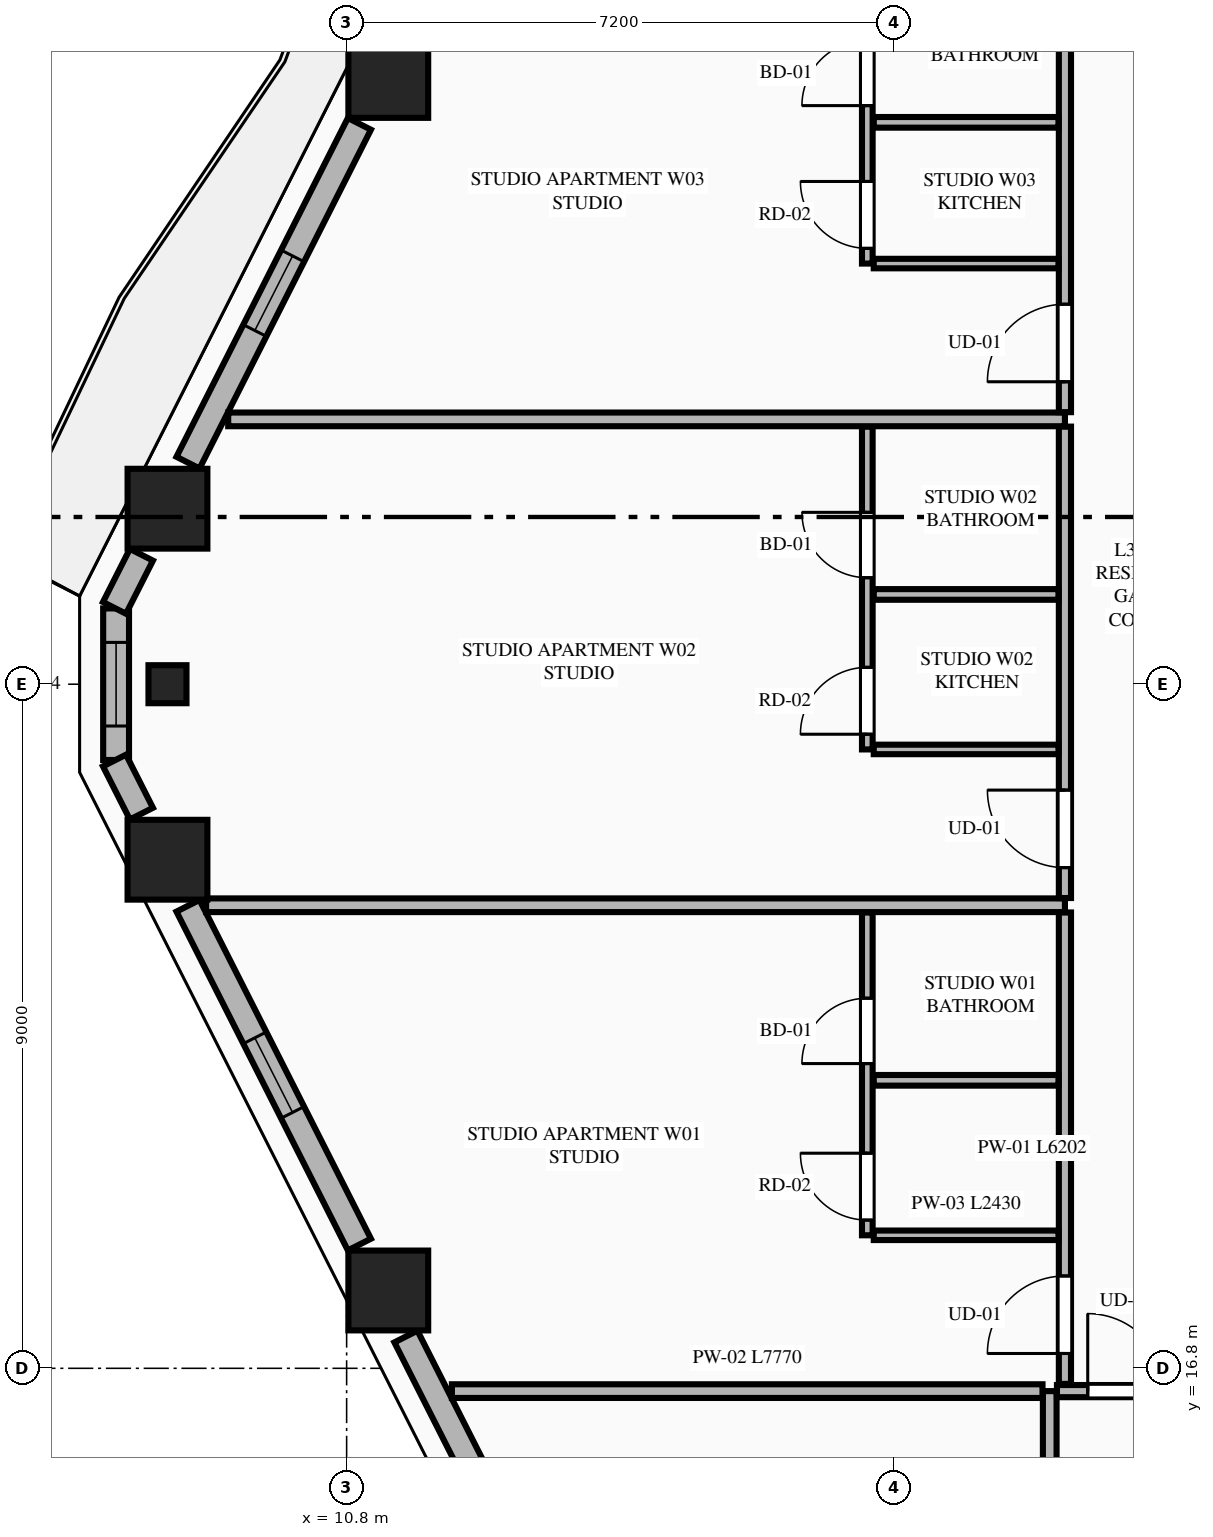
"""IFC4 building model, lengths in metres.
Left out: names, types, materials, properties, quantities, classifications, styles, units other than length and angle.
Written with IfcOpenShell. Run it as: python <this file> out.ifc"""

import sys

from ifc_helpers import new_model, si_unit, direction, frame, frame_2d, origin, origin_2d, place, context, subcontext, project, spatial, rectangle, extrude, element, fill, save


model = new_model("IFC4")
c1 = context("Model", 3, precision=1e-05, world=origin(), true_north=direction((0.0, 1.0)))
c2 = subcontext(c1, "Body", "Model", "MODEL_VIEW")
j1 = project(units=[si_unit("LENGTHUNIT", "METRE"), si_unit("PLANEANGLEUNIT", "RADIAN")], contexts=[c1])
p1 = place(None, origin())
s1 = spatial("IfcSite", under=j1, at=p1, CompositionType="ELEMENT")
p2 = place(p1, origin())
s2 = spatial("IfcBuilding", under=s1, at=p2, CompositionType="ELEMENT")
p3 = place(p2, frame((0.0, 0.0, 137.45)))
s3 = spatial("IfcBuildingStorey", under=s2, at=p3, CompositionType="ELEMENT", Elevation=137.45)
for number, where, z_axis, x_axis in (
    (1, (11.348, 33.776, 0.0), (0.0, 0.0, 1.0), (1.0, 0.0, 0.0)),
    (2, (8.443, 28.109, 0.0), (0.0, 0.0, 1.0), (1.0, 0.0, 0.0)),
    (3, (8.443, 23.491, 0.0), (0.0, 0.0, 1.0), (1.0, 0.0, 0.0)),
    (4, (11.348, 17.824, 0.0), (0.0, 0.0, 1.0), (1.0, 0.0, 0.0)),
):
    element("IfcColumn", number, at=place(p3, frame(where, z_axis=z_axis, x_axis=x_axis)), inside=s3, PredefinedType="COLUMN", context=c2, shape_type="SweptSolid", body=[
        extrude(rectangle(XDim=1.05, YDim=1.05, at=origin_2d()), origin(), (0.0, 0.0, 1.0), 3.55),
    ])
p4 = place(p3, frame((8.443, 25.8, 0.0), z_axis=(0.0, 0.0, 1.0), x_axis=(0.0, -1.0, 0.0)))
e5 = element("IfcColumn", 5, at=p4, inside=s3, PredefinedType="PILASTER", context=c2, shape_type="SweptSolid", body=[
    extrude(rectangle(XDim=0.5, YDim=0.35, at=origin_2d()), origin(), (0.0, 0.0, 1.0), 3.55),
])
p5 = place(p3, frame((7.767, 26.797, 0.0), z_axis=(0.0, 0.0, 1.0), x_axis=(0.0, -1.0, 0.0)))
e6 = element("IfcWall", 6, at=p5, inside=s3, PredefinedType="STANDARD", context=c2, shape_type="SweptSolid", body=[
    extrude(rectangle(XDim=1.994, YDim=0.34, at=frame_2d((0.997, 0.0))), origin(), (0.0, 0.0, 1.0), 3.34),
])
p6 = place(p5, frame((0.447, 0.0, 0.75)))
e7 = element("IfcOpeningElement", 7, at=p6, cuts=e6, PredefinedType="OPENING", context=c2, shape_type="SweptSolid", body=[
    extrude(rectangle(XDim=1.1, YDim=2.0, at=frame_2d((0.55, 1.0))), frame((0.0, 0.18, 0.0), z_axis=(0.0, -1.0, 0.0), x_axis=(1.0, 0.0, 0.0)), (0.0, 0.0, 1.0), 0.36),
])
p7 = place(p3, frame((10.968, 33.172, 0.0), z_axis=(0.0, 0.0, 1.0), x_axis=(-0.451470533039, -0.892286029139, 0.0)))
e8 = element("IfcWall", 8, at=p7, inside=s3, PredefinedType="STANDARD", context=c2, shape_type="SweptSolid", body=[
    extrude(rectangle(XDim=4.995, YDim=0.34, at=frame_2d((2.498, 0.0))), origin(), (0.0, 0.0, 1.0), 2.797),
])
p8 = place(p7, frame((1.947, 0.0, 0.75)))
e9 = element("IfcOpeningElement", 9, at=p8, cuts=e8, PredefinedType="OPENING", context=c2, shape_type="SweptSolid", body=[
    extrude(rectangle(XDim=1.1, YDim=1.897, at=frame_2d((0.55, 0.948))), frame((0.0, 0.18, 0.0), z_axis=(0.0, -1.0, 0.0), x_axis=(1.0, 0.0, 0.0)), (0.0, 0.0, 1.0), 0.36),
])
for number, where, z_axis, x_axis in (
    (10, (8.1, 27.503, 0.0), (0.0, 0.0, 1.0), (-0.452, -0.892, 0.0)),
    (11, (7.746, 24.796, 0.0), (0.0, 0.0, 1.0), (0.452, -0.892, 0.0)),
):
    element("IfcWall", number, at=place(p3, frame(where, z_axis=z_axis, x_axis=x_axis)), inside=s3, PredefinedType="STANDARD", context=c2, shape_type="SweptSolid", body=[
        extrude(rectangle(XDim=0.783, YDim=0.34, at=frame_2d((0.392, 0.0))), origin(), (0.0, 0.0, 1.0), 3.34),
    ])
p9 = place(p3, frame((8.713, 22.885, 0.0), z_axis=(0.0, 0.0, 1.0), x_axis=(0.451470533039, -0.892286029139, 0.0)))
e12 = element("IfcWall", 12, at=p9, inside=s3, PredefinedType="STANDARD", context=c2, shape_type="SweptSolid", body=[
    extrude(rectangle(XDim=4.995, YDim=0.34, at=frame_2d((2.498, 0.0))), origin(), (0.0, 0.0, 1.0), 2.797),
])
p10 = place(p9, frame((1.947, 0.0, 0.75)))
e13 = element("IfcOpeningElement", 13, at=p10, cuts=e12, PredefinedType="OPENING", context=c2, shape_type="SweptSolid", body=[
    extrude(rectangle(XDim=1.1, YDim=1.897, at=frame_2d((0.55, 0.948))), frame((0.0, 0.18, 0.0), z_axis=(0.0, -1.0, 0.0), x_axis=(1.0, 0.0, 0.0)), (0.0, 0.0, 1.0), 0.36),
])
p11 = place(p3, frame((11.58, 17.218, 0.0), z_axis=(0.0, 0.0, 1.0), x_axis=(0.451567731634, -0.892236842855, 0.0)))
e14 = element("IfcWall", 14, at=p11, inside=s3, PredefinedType="STANDARD", context=c2, shape_type="SweptSolid", body=[
    extrude(rectangle(XDim=5.219, YDim=0.34, at=frame_2d((2.61, 0.0))), origin(), (0.0, 0.0, 1.0), 2.797),
])
p12 = place(p11, frame((2.06, 0.0, 0.75)))
e15 = element("IfcOpeningElement", 15, at=p12, cuts=e14, PredefinedType="OPENING", context=c2, shape_type="SweptSolid", body=[
    extrude(rectangle(XDim=1.1, YDim=1.897, at=frame_2d((0.55, 0.948))), frame((0.0, 0.18, 0.0), z_axis=(0.0, -1.0, 0.0), x_axis=(1.0, 0.0, 0.0)), (0.0, 0.0, 1.0), 0.36),
])
p13 = place(p3, frame((20.05, 4.105, 0.0), z_axis=(0.0, 0.0, 1.0), x_axis=(0.0, 1.0, 0.0)))
e16 = element("IfcWall", 16, at=p13, inside=s3, PredefinedType="PARTITIONING", context=c2, shape_type="SweptSolid", body=[
    extrude(rectangle(XDim=12.395, YDim=0.18, at=frame_2d((6.198, 0.0))), origin(), (0.0, 0.0, 1.0), 3.34),
])
p14 = place(p3, frame((20.145, 16.5, 0.0), z_axis=(0.0, 0.0, 1.0), x_axis=(1.0, 0.0, 0.0)))
e17 = element("IfcWall", 17, at=p14, inside=s3, PredefinedType="PARTITIONING", context=c2, shape_type="SweptSolid", body=[
    extrude(rectangle(XDim=8.328, YDim=0.16, at=frame_2d((4.164, 0.0))), origin(), (0.0, 0.0, 1.0), 3.34),
])
p15 = place(p14, frame((0.405, 0.0, 0.0)))
e18 = element("IfcOpeningElement", 18, at=p15, cuts=e17, PredefinedType="OPENING", context=c2, shape_type="SweptSolid", body=[
    extrude(rectangle(XDim=1.02, YDim=2.25, at=frame_2d((0.51, 1.125))), frame((0.0, 0.09, 0.0), z_axis=(0.0, -1.0, 0.0), x_axis=(1.0, 0.0, 0.0)), (0.0, 0.0, 1.0), 0.18),
])
p16 = place(p3, frame((12.185, 16.5, 0.0), z_axis=(0.0, 0.0, 1.0), x_axis=(1.0, 0.0, 0.0)))
e19 = element("IfcWall", 19, at=p16, inside=s3, PredefinedType="PARTITIONING", context=c2, shape_type="SweptSolid", body=[
    extrude(rectangle(XDim=7.77, YDim=0.18, at=frame_2d((3.885, 0.0))), origin(), (0.0, 0.0, 1.0), 3.34),
])
p17 = place(p3, frame((20.25, 16.595, 0.0), z_axis=(0.0, 0.0, 1.0), x_axis=(0.0, 1.0, 0.0)))
e20 = element("IfcWall", 20, at=p17, inside=s3, PredefinedType="PARTITIONING", context=c2, shape_type="SweptSolid", body=[
    extrude(rectangle(XDim=6.202, YDim=0.16, at=frame_2d((3.101, 0.0))), origin(), (0.0, 0.0, 1.0), 3.34),
])
p18 = place(p17, frame((0.4, 0.0, 0.0)))
e21 = element("IfcOpeningElement", 21, at=p18, cuts=e20, PredefinedType="OPENING", context=c2, shape_type="SweptSolid", body=[
    extrude(rectangle(XDim=1.02, YDim=2.25, at=frame_2d((0.51, 1.125))), frame((0.0, 0.09, 0.0), z_axis=(0.0, -1.0, 0.0), x_axis=(1.0, 0.0, 0.0)), (0.0, 0.0, 1.0), 0.18),
])
p19 = place(p3, frame((17.735, 18.55, 0.0), z_axis=(0.0, 0.0, 1.0), x_axis=(1.0, 0.0, 0.0)))
e22 = element("IfcWall", 22, at=p19, inside=s3, PredefinedType="PARTITIONING", context=c2, shape_type="SweptSolid", body=[
    extrude(rectangle(XDim=2.43, YDim=0.125, at=frame_2d((1.215, 0.0))), origin(), (0.0, 0.0, 1.0), 2.722),
])
p20 = place(p3, frame((17.65, 18.55, 0.0), z_axis=(0.0, 0.0, 1.0), x_axis=(0.0, 1.0, 0.0)))
e23 = element("IfcWall", 23, at=p20, inside=s3, PredefinedType="PLUMBINGWALL", context=c2, shape_type="SweptSolid", body=[
    extrude(rectangle(XDim=4.247, YDim=0.14, at=frame_2d((2.124, 0.0))), origin(), (0.0, 0.0, 1.0), 3.34),
])
p21 = place(p20, frame((2.259, 0.0, 0.0)))
e24 = element("IfcOpeningElement", 24, at=p21, cuts=e23, PredefinedType="OPENING", context=c2, shape_type="SweptSolid", body=[
    extrude(rectangle(XDim=0.86, YDim=2.1, at=frame_2d((0.43, 1.05))), frame((0.0, 0.08, 0.0), z_axis=(0.0, -1.0, 0.0), x_axis=(1.0, 0.0, 0.0)), (0.0, 0.0, 1.0), 0.16),
])
p22 = place(p20, frame((0.2, 0.0, 0.0)))
e25 = element("IfcOpeningElement", 25, at=p22, cuts=e23, PredefinedType="OPENING", context=c2, shape_type="SweptSolid", body=[
    extrude(rectangle(XDim=0.88, YDim=2.15, at=frame_2d((0.44, 1.075))), frame((0.0, 0.08, 0.0), z_axis=(0.0, -1.0, 0.0), x_axis=(1.0, 0.0, 0.0)), (0.0, 0.0, 1.0), 0.16),
])
p23 = place(p3, frame((17.735, 20.589, 0.0), z_axis=(0.0, 0.0, 1.0), x_axis=(1.0, 0.0, 0.0)))
e26 = element("IfcWall", 26, at=p23, inside=s3, PredefinedType="PLUMBINGWALL", context=c2, shape_type="SweptSolid", body=[
    extrude(rectangle(XDim=2.43, YDim=0.14, at=frame_2d((1.215, 0.0))), origin(), (0.0, 0.0, 1.0), 3.34),
])
p24 = place(p3, frame((8.951, 22.892, 0.0), z_axis=(0.0, 0.0, 1.0), x_axis=(1.0, 0.0, 0.0)))
e27 = element("IfcWall", 27, at=p24, inside=s3, PredefinedType="PARTITIONING", context=c2, shape_type="SweptSolid", body=[
    extrude(rectangle(XDim=11.299, YDim=0.18, at=frame_2d((5.649, 0.0))), origin(), (0.0, 0.0, 1.0), 3.34),
])
p25 = place(p3, frame((20.25, 22.987, 0.0), z_axis=(0.0, 0.0, 1.0), x_axis=(0.0, 1.0, 0.0)))
e28 = element("IfcWall", 28, at=p25, inside=s3, PredefinedType="PARTITIONING", context=c2, shape_type="SweptSolid", body=[
    extrude(rectangle(XDim=6.202, YDim=0.16, at=frame_2d((3.101, 0.0))), origin(), (0.0, 0.0, 1.0), 3.34),
])
p26 = place(p25, frame((0.4, 0.0, 0.0)))
e29 = element("IfcOpeningElement", 29, at=p26, cuts=e28, PredefinedType="OPENING", context=c2, shape_type="SweptSolid", body=[
    extrude(rectangle(XDim=1.02, YDim=2.25, at=frame_2d((0.51, 1.125))), frame((0.0, 0.09, 0.0), z_axis=(0.0, -1.0, 0.0), x_axis=(1.0, 0.0, 0.0)), (0.0, 0.0, 1.0), 0.18),
])
p27 = place(p3, frame((17.735, 24.942, 0.0), z_axis=(0.0, 0.0, 1.0), x_axis=(1.0, 0.0, 0.0)))
e30 = element("IfcWall", 30, at=p27, inside=s3, PredefinedType="PARTITIONING", context=c2, shape_type="SweptSolid", body=[
    extrude(rectangle(XDim=2.43, YDim=0.125, at=frame_2d((1.215, 0.0))), origin(), (0.0, 0.0, 1.0), 3.34),
])
p28 = place(p3, frame((17.65, 24.942, 0.0), z_axis=(0.0, 0.0, 1.0), x_axis=(0.0, 1.0, 0.0)))
e31 = element("IfcWall", 31, at=p28, inside=s3, PredefinedType="PLUMBINGWALL", context=c2, shape_type="SweptSolid", body=[
    extrude(rectangle(XDim=4.247, YDim=0.14, at=frame_2d((2.124, 0.0))), origin(), (0.0, 0.0, 1.0), 3.34),
])
p29 = place(p28, frame((2.259, 0.0, 0.0)))
e32 = element("IfcOpeningElement", 32, at=p29, cuts=e31, PredefinedType="OPENING", context=c2, shape_type="SweptSolid", body=[
    extrude(rectangle(XDim=0.86, YDim=2.1, at=frame_2d((0.43, 1.05))), frame((0.0, 0.08, 0.0), z_axis=(0.0, -1.0, 0.0), x_axis=(1.0, 0.0, 0.0)), (0.0, 0.0, 1.0), 0.16),
])
p30 = place(p28, frame((0.2, 0.0, 0.0)))
e33 = element("IfcOpeningElement", 33, at=p30, cuts=e31, PredefinedType="OPENING", context=c2, shape_type="SweptSolid", body=[
    extrude(rectangle(XDim=0.88, YDim=2.15, at=frame_2d((0.44, 1.075))), frame((0.0, 0.08, 0.0), z_axis=(0.0, -1.0, 0.0), x_axis=(1.0, 0.0, 0.0)), (0.0, 0.0, 1.0), 0.16),
])
p31 = place(p3, frame((17.735, 26.981, 0.0), z_axis=(0.0, 0.0, 1.0), x_axis=(1.0, 0.0, 0.0)))
e34 = element("IfcWall", 34, at=p31, inside=s3, PredefinedType="PLUMBINGWALL", context=c2, shape_type="SweptSolid", body=[
    extrude(rectangle(XDim=2.43, YDim=0.14, at=frame_2d((1.215, 0.0))), origin(), (0.0, 0.0, 1.0), 3.34),
])
p32 = place(p3, frame((9.242, 29.284, 0.0), z_axis=(0.0, 0.0, 1.0), x_axis=(1.0, 0.0, 0.0)))
e35 = element("IfcWall", 35, at=p32, inside=s3, PredefinedType="PARTITIONING", context=c2, shape_type="SweptSolid", body=[
    extrude(rectangle(XDim=11.008, YDim=0.18, at=frame_2d((5.504, 0.0))), origin(), (0.0, 0.0, 1.0), 3.34),
])
p33 = place(p3, frame((20.25, 29.379, 0.0), z_axis=(0.0, 0.0, 1.0), x_axis=(0.0, 1.0, 0.0)))
e36 = element("IfcWall", 36, at=p33, inside=s3, PredefinedType="PARTITIONING", context=c2, shape_type="SweptSolid", body=[
    extrude(rectangle(XDim=5.826, YDim=0.16, at=frame_2d((2.913, 0.0))), origin(), (0.0, 0.0, 1.0), 3.34),
])
p34 = place(p33, frame((0.4, 0.0, 0.0)))
e37 = element("IfcOpeningElement", 37, at=p34, cuts=e36, PredefinedType="OPENING", context=c2, shape_type="SweptSolid", body=[
    extrude(rectangle(XDim=1.02, YDim=2.25, at=frame_2d((0.51, 1.125))), frame((0.0, 0.09, 0.0), z_axis=(0.0, -1.0, 0.0), x_axis=(1.0, 0.0, 0.0)), (0.0, 0.0, 1.0), 0.18),
])
p35 = place(p3, frame((17.735, 31.334, 0.0), z_axis=(0.0, 0.0, 1.0), x_axis=(1.0, 0.0, 0.0)))
e38 = element("IfcWall", 38, at=p35, inside=s3, PredefinedType="PARTITIONING", context=c2, shape_type="SweptSolid", body=[
    extrude(rectangle(XDim=2.43, YDim=0.125, at=frame_2d((1.215, 0.0))), origin(), (0.0, 0.0, 1.0), 3.34),
])
p36 = place(p3, frame((17.65, 31.334, 0.0), z_axis=(0.0, 0.0, 1.0), x_axis=(0.0, 1.0, 0.0)))
e39 = element("IfcWall", 39, at=p36, inside=s3, PredefinedType="PLUMBINGWALL", context=c2, shape_type="SweptSolid", body=[
    extrude(rectangle(XDim=3.871, YDim=0.14, at=frame_2d((1.936, 0.0))), origin(), (0.0, 0.0, 1.0), 3.34),
])
p37 = place(p36, frame((2.078, 0.0, 0.0)))
e40 = element("IfcOpeningElement", 40, at=p37, cuts=e39, PredefinedType="OPENING", context=c2, shape_type="SweptSolid", body=[
    extrude(rectangle(XDim=0.86, YDim=2.1, at=frame_2d((0.43, 1.05))), frame((0.0, 0.08, 0.0), z_axis=(0.0, -1.0, 0.0), x_axis=(1.0, 0.0, 0.0)), (0.0, 0.0, 1.0), 0.16),
])
p38 = place(p36, frame((0.2, 0.0, 0.0)))
e41 = element("IfcOpeningElement", 41, at=p38, cuts=e39, PredefinedType="OPENING", context=c2, shape_type="SweptSolid", body=[
    extrude(rectangle(XDim=0.88, YDim=2.15, at=frame_2d((0.44, 1.075))), frame((0.0, 0.08, 0.0), z_axis=(0.0, -1.0, 0.0), x_axis=(1.0, 0.0, 0.0)), (0.0, 0.0, 1.0), 0.16),
])
p39 = place(p3, frame((17.735, 33.192, 0.0), z_axis=(0.0, 0.0, 1.0), x_axis=(1.0, 0.0, 0.0)))
e42 = element("IfcWall", 42, at=p39, inside=s3, PredefinedType="PLUMBINGWALL", context=c2, shape_type="SweptSolid", body=[
    extrude(rectangle(XDim=2.43, YDim=0.14, at=frame_2d((1.215, 0.0))), origin(), (0.0, 0.0, 1.0), 2.722),
])
p40 = place(p8, origin())
e43 = element("IfcWindow", 43, at=p40, inside=s3, PartitioningType="SINGLE_PANEL", PredefinedType="WINDOW", context=c2, shape_type="SweptSolid", body=[
    extrude(rectangle(XDim=1.1, YDim=1.897, at=frame_2d((0.55, 0.948))), frame((0.0, 0.03, 0.0), z_axis=(0.0, -1.0, 0.0), x_axis=(1.0, 0.0, 0.0)), (0.0, 0.0, 1.0), 0.06),
])
fill(e9, e43)
p41 = place(p10, origin())
e44 = element("IfcWindow", 44, at=p41, inside=s3, PartitioningType="SINGLE_PANEL", PredefinedType="WINDOW", context=c2, shape_type="SweptSolid", body=[
    extrude(rectangle(XDim=1.1, YDim=1.897, at=frame_2d((0.55, 0.948))), frame((0.0, 0.03, 0.0), z_axis=(0.0, -1.0, 0.0), x_axis=(1.0, 0.0, 0.0)), (0.0, 0.0, 1.0), 0.06),
])
fill(e13, e44)
p42 = place(p15, origin())
e45 = element("IfcDoor", 45, at=p42, inside=s3, OperationType="SINGLE_SWING_LEFT", PredefinedType="DOOR", context=c2, shape_type="SweptSolid", body=[
    extrude(rectangle(XDim=1.02, YDim=2.25, at=frame_2d((0.51, 1.125))), frame((0.0, 0.025, 0.0), z_axis=(0.0, -1.0, 0.0), x_axis=(1.0, 0.0, 0.0)), (0.0, 0.0, 1.0), 0.05),
])
fill(e18, e45)
p43 = place(p21, origin())
e46 = element("IfcDoor", 46, at=p43, inside=s3, OperationType="SINGLE_SWING_LEFT", PredefinedType="DOOR", context=c2, shape_type="SweptSolid", body=[
    extrude(rectangle(XDim=0.86, YDim=2.1, at=frame_2d((0.43, 1.05))), frame((0.0, 0.025, 0.0), z_axis=(0.0, -1.0, 0.0), x_axis=(1.0, 0.0, 0.0)), (0.0, 0.0, 1.0), 0.05),
])
fill(e24, e46)
p44 = place(p18, origin())
e47 = element("IfcDoor", 47, at=p44, inside=s3, OperationType="SINGLE_SWING_LEFT", PredefinedType="DOOR", context=c2, shape_type="SweptSolid", body=[
    extrude(rectangle(XDim=1.02, YDim=2.25, at=frame_2d((0.51, 1.125))), frame((0.0, 0.025, 0.0), z_axis=(0.0, -1.0, 0.0), x_axis=(1.0, 0.0, 0.0)), (0.0, 0.0, 1.0), 0.05),
])
fill(e21, e47)
p45 = place(p22, origin())
e48 = element("IfcDoor", 48, at=p45, inside=s3, OperationType="SINGLE_SWING_RIGHT", PredefinedType="DOOR", context=c2, shape_type="SweptSolid", body=[
    extrude(rectangle(XDim=0.88, YDim=2.15, at=frame_2d((0.44, 1.075))), frame((0.0, 0.025, 0.0), z_axis=(0.0, -1.0, 0.0), x_axis=(1.0, 0.0, 0.0)), (0.0, 0.0, 1.0), 0.05),
])
fill(e25, e48)
p46 = place(p29, origin())
e49 = element("IfcDoor", 49, at=p46, inside=s3, OperationType="SINGLE_SWING_RIGHT", PredefinedType="DOOR", context=c2, shape_type="SweptSolid", body=[
    extrude(rectangle(XDim=0.86, YDim=2.1, at=frame_2d((0.43, 1.05))), frame((0.0, 0.025, 0.0), z_axis=(0.0, -1.0, 0.0), x_axis=(1.0, 0.0, 0.0)), (0.0, 0.0, 1.0), 0.05),
])
fill(e32, e49)
p47 = place(p26, origin())
e50 = element("IfcDoor", 50, at=p47, inside=s3, OperationType="SINGLE_SWING_RIGHT", PredefinedType="DOOR", context=c2, shape_type="SweptSolid", body=[
    extrude(rectangle(XDim=1.02, YDim=2.25, at=frame_2d((0.51, 1.125))), frame((0.0, 0.025, 0.0), z_axis=(0.0, -1.0, 0.0), x_axis=(1.0, 0.0, 0.0)), (0.0, 0.0, 1.0), 0.05),
])
fill(e29, e50)
p48 = place(p30, origin())
e51 = element("IfcDoor", 51, at=p48, inside=s3, OperationType="SINGLE_SWING_LEFT", PredefinedType="DOOR", context=c2, shape_type="SweptSolid", body=[
    extrude(rectangle(XDim=0.88, YDim=2.15, at=frame_2d((0.44, 1.075))), frame((0.0, 0.025, 0.0), z_axis=(0.0, -1.0, 0.0), x_axis=(1.0, 0.0, 0.0)), (0.0, 0.0, 1.0), 0.05),
])
fill(e33, e51)
p49 = place(p37, origin())
e52 = element("IfcDoor", 52, at=p49, inside=s3, OperationType="SINGLE_SWING_LEFT", PredefinedType="DOOR", context=c2, shape_type="SweptSolid", body=[
    extrude(rectangle(XDim=0.86, YDim=2.1, at=frame_2d((0.43, 1.05))), frame((0.0, 0.025, 0.0), z_axis=(0.0, -1.0, 0.0), x_axis=(1.0, 0.0, 0.0)), (0.0, 0.0, 1.0), 0.05),
])
fill(e40, e52)
p50 = place(p34, origin())
e53 = element("IfcDoor", 53, at=p50, inside=s3, OperationType="SINGLE_SWING_LEFT", PredefinedType="DOOR", context=c2, shape_type="SweptSolid", body=[
    extrude(rectangle(XDim=1.02, YDim=2.25, at=frame_2d((0.51, 1.125))), frame((0.0, 0.025, 0.0), z_axis=(0.0, -1.0, 0.0), x_axis=(1.0, 0.0, 0.0)), (0.0, 0.0, 1.0), 0.05),
])
fill(e37, e53)
p51 = place(p38, origin())
e54 = element("IfcDoor", 54, at=p51, inside=s3, OperationType="SINGLE_SWING_RIGHT", PredefinedType="DOOR", context=c2, shape_type="SweptSolid", body=[
    extrude(rectangle(XDim=0.88, YDim=2.15, at=frame_2d((0.44, 1.075))), frame((0.0, 0.025, 0.0), z_axis=(0.0, -1.0, 0.0), x_axis=(1.0, 0.0, 0.0)), (0.0, 0.0, 1.0), 0.05),
])
fill(e41, e54)
p52 = place(p6, origin())
e55 = element("IfcWindow", 55, at=p52, inside=s3, PartitioningType="SINGLE_PANEL", PredefinedType="WINDOW", context=c2, shape_type="SweptSolid", body=[
    extrude(rectangle(XDim=1.1, YDim=2.0, at=frame_2d((0.55, 1.0))), frame((0.0, 0.03, 0.0), z_axis=(0.0, -1.0, 0.0), x_axis=(1.0, 0.0, 0.0)), (0.0, 0.0, 1.0), 0.06),
])
fill(e7, e55)
save(model, sys.argv[1])
